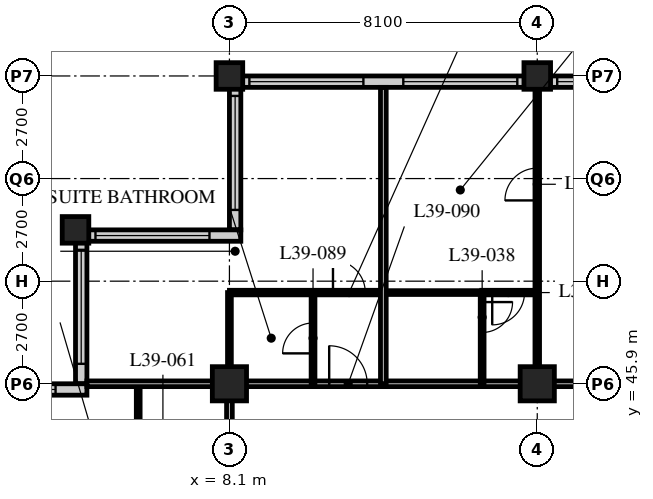
"""IFC4 building model, lengths in metres.
Left out: names, types, materials, properties, quantities, classifications, styles, units other than length and angle.
Written with IfcOpenShell. Run it as: python <this file> out.ifc"""

import sys

from ifc_helpers import new_model, si_unit, direction, frame, frame_2d, origin, origin_2d, place, context, subcontext, project, spatial, rectangle, hollow_rectangle, extrude, element, fill, save


model = new_model("IFC4")
c1 = context("Model", 3, precision=1e-05, world=origin(), true_north=direction((0.0, 1.0)))
c2 = subcontext(c1, "Body", "Model", "MODEL_VIEW")
j1 = project(units=[si_unit("LENGTHUNIT", "METRE"), si_unit("PLANEANGLEUNIT", "RADIAN")], contexts=[c1])
p1 = place(None, origin())
s1 = spatial("IfcSite", under=j1, at=p1, CompositionType="ELEMENT")
p2 = place(p1, origin())
s2 = spatial("IfcBuilding", under=s1, at=p2, CompositionType="ELEMENT")
p3 = place(p2, frame((0.0, 0.0, 151.0)))
s3 = spatial("IfcBuildingStorey", under=s2, at=p3, CompositionType="ELEMENT", Elevation=151.0)
p4 = place(p3, frame((4.05, 49.95, 0.0), z_axis=(0.0, 0.0, 1.0), x_axis=(1.0, 0.0, 0.0)))
e1 = element("IfcColumn", 1, at=p4, inside=s3, PredefinedType="COLUMN", context=c2, shape_type="SweptSolid", body=[
    extrude(hollow_rectangle(XDim=0.7, YDim=0.7, WallThickness=0.07, at=origin_2d()), origin(), (0.0, 0.0, 1.0), 3.4),
])
p5 = place(p3, frame((8.1, 45.9, 0.0), z_axis=(0.0, 0.0, 1.0), x_axis=(1.0, 0.0, 0.0)))
e2 = element("IfcColumn", 2, at=p5, inside=s3, PredefinedType="COLUMN", context=c2, shape_type="SweptSolid", body=[
    extrude(hollow_rectangle(XDim=0.9, YDim=0.9, WallThickness=0.1, at=origin_2d()), origin(), (0.0, 0.0, 1.0), 3.4),
])
p6 = place(p3, frame((8.1, 54.0, 0.0), z_axis=(0.0, 0.0, 1.0), x_axis=(1.0, 0.0, 0.0)))
e3 = element("IfcColumn", 3, at=p6, inside=s3, PredefinedType="COLUMN", context=c2, shape_type="SweptSolid", body=[
    extrude(hollow_rectangle(XDim=0.7, YDim=0.7, WallThickness=0.07, at=origin_2d()), origin(), (0.0, 0.0, 1.0), 3.4),
])
p7 = place(p3, frame((16.2, 45.9, 0.0), z_axis=(0.0, 0.0, 1.0), x_axis=(1.0, 0.0, 0.0)))
e4 = element("IfcColumn", 4, at=p7, inside=s3, PredefinedType="COLUMN", context=c2, shape_type="SweptSolid", body=[
    extrude(hollow_rectangle(XDim=0.9, YDim=0.9, WallThickness=0.1, at=origin_2d()), origin(), (0.0, 0.0, 1.0), 3.4),
])
p8 = place(p3, frame((16.2, 54.0, 0.0), z_axis=(0.0, 0.0, 1.0), x_axis=(1.0, 0.0, 0.0)))
e5 = element("IfcColumn", 5, at=p8, inside=s3, PredefinedType="COLUMN", context=c2, shape_type="SweptSolid", body=[
    extrude(hollow_rectangle(XDim=0.7, YDim=0.7, WallThickness=0.07, at=origin_2d()), origin(), (0.0, 0.0, 1.0), 3.4),
])
p9 = place(p3, frame((48.3, 53.85, 0.0), z_axis=(0.0, 0.0, 1.0), x_axis=(-1.0, 0.0, 0.0)))
e6 = element("IfcWall", 6, at=p9, inside=s3, PredefinedType="SOLIDWALL", context=c2, shape_type="SweptSolid", body=[
    extrude(rectangle(XDim=40.2, YDim=0.3, at=frame_2d((20.1, 0.0))), origin(), (0.0, 0.0, 1.0), 3.19),
])
p10 = place(p9, frame((0.225, 0.0, 0.9)))
e7 = element("IfcOpeningElement", 7, at=p10, cuts=e6, PredefinedType="OPENING", context=c2, shape_type="SweptSolid", body=[
    extrude(rectangle(XDim=3.0, YDim=1.4, at=frame_2d((1.5, 0.7))), frame((0.0, 0.16, 0.0), z_axis=(0.0, -1.0, 0.0), x_axis=(1.0, 0.0, 0.0)), (0.0, 0.0, 1.0), 0.32),
])
p11 = place(p9, frame((4.275, 0.0, 0.9)))
e8 = element("IfcOpeningElement", 8, at=p11, cuts=e6, PredefinedType="OPENING", context=c2, shape_type="SweptSolid", body=[
    extrude(rectangle(XDim=3.0, YDim=1.4, at=frame_2d((1.5, 0.7))), frame((0.0, 0.16, 0.0), z_axis=(0.0, -1.0, 0.0), x_axis=(1.0, 0.0, 0.0)), (0.0, 0.0, 1.0), 0.32),
])
p12 = place(p9, frame((8.325, 0.0, 0.9)))
e9 = element("IfcOpeningElement", 9, at=p12, cuts=e6, PredefinedType="OPENING", context=c2, shape_type="SweptSolid", body=[
    extrude(rectangle(XDim=3.0, YDim=1.4, at=frame_2d((1.5, 0.7))), frame((0.0, 0.16, 0.0), z_axis=(0.0, -1.0, 0.0), x_axis=(1.0, 0.0, 0.0)), (0.0, 0.0, 1.0), 0.32),
])
p13 = place(p9, frame((12.375, 0.0, 0.9)))
e10 = element("IfcOpeningElement", 10, at=p13, cuts=e6, PredefinedType="OPENING", context=c2, shape_type="SweptSolid", body=[
    extrude(rectangle(XDim=3.0, YDim=1.4, at=frame_2d((1.5, 0.7))), frame((0.0, 0.16, 0.0), z_axis=(0.0, -1.0, 0.0), x_axis=(1.0, 0.0, 0.0)), (0.0, 0.0, 1.0), 0.32),
])
p14 = place(p9, frame((16.425, 0.0, 0.9)))
e11 = element("IfcOpeningElement", 11, at=p14, cuts=e6, PredefinedType="OPENING", context=c2, shape_type="SweptSolid", body=[
    extrude(rectangle(XDim=3.0, YDim=1.4, at=frame_2d((1.5, 0.7))), frame((0.0, 0.16, 0.0), z_axis=(0.0, -1.0, 0.0), x_axis=(1.0, 0.0, 0.0)), (0.0, 0.0, 1.0), 0.32),
])
p15 = place(p9, frame((20.475, 0.0, 0.9)))
e12 = element("IfcOpeningElement", 12, at=p15, cuts=e6, PredefinedType="OPENING", context=c2, shape_type="SweptSolid", body=[
    extrude(rectangle(XDim=3.0, YDim=1.4, at=frame_2d((1.5, 0.7))), frame((0.0, 0.16, 0.0), z_axis=(0.0, -1.0, 0.0), x_axis=(1.0, 0.0, 0.0)), (0.0, 0.0, 1.0), 0.32),
])
p16 = place(p9, frame((24.525, 0.0, 0.9)))
e13 = element("IfcOpeningElement", 13, at=p16, cuts=e6, PredefinedType="OPENING", context=c2, shape_type="SweptSolid", body=[
    extrude(rectangle(XDim=3.0, YDim=1.4, at=frame_2d((1.5, 0.7))), frame((0.0, 0.16, 0.0), z_axis=(0.0, -1.0, 0.0), x_axis=(1.0, 0.0, 0.0)), (0.0, 0.0, 1.0), 0.32),
])
p17 = place(p9, frame((28.575, 0.0, 0.9)))
e14 = element("IfcOpeningElement", 14, at=p17, cuts=e6, PredefinedType="OPENING", context=c2, shape_type="SweptSolid", body=[
    extrude(rectangle(XDim=3.0, YDim=1.4, at=frame_2d((1.5, 0.7))), frame((0.0, 0.16, 0.0), z_axis=(0.0, -1.0, 0.0), x_axis=(1.0, 0.0, 0.0)), (0.0, 0.0, 1.0), 0.32),
])
p18 = place(p9, frame((32.625, 0.0, 0.9)))
e15 = element("IfcOpeningElement", 15, at=p18, cuts=e6, PredefinedType="OPENING", context=c2, shape_type="SweptSolid", body=[
    extrude(rectangle(XDim=3.0, YDim=1.4, at=frame_2d((1.5, 0.7))), frame((0.0, 0.16, 0.0), z_axis=(0.0, -1.0, 0.0), x_axis=(1.0, 0.0, 0.0)), (0.0, 0.0, 1.0), 0.32),
])
p19 = place(p9, frame((36.675, 0.0, 0.9)))
e16 = element("IfcOpeningElement", 16, at=p19, cuts=e6, PredefinedType="OPENING", context=c2, shape_type="SweptSolid", body=[
    extrude(rectangle(XDim=3.0, YDim=1.4, at=frame_2d((1.5, 0.7))), frame((0.0, 0.16, 0.0), z_axis=(0.0, -1.0, 0.0), x_axis=(1.0, 0.0, 0.0)), (0.0, 0.0, 1.0), 0.32),
])
p20 = place(p3, frame((8.25, 53.7, 0.0), z_axis=(0.0, 0.0, 1.0), x_axis=(0.0, -1.0, 0.0)))
e17 = element("IfcWall", 17, at=p20, inside=s3, PredefinedType="SOLIDWALL", context=c2, shape_type="SweptSolid", body=[
    extrude(rectangle(XDim=3.75, YDim=0.3, at=frame_2d((1.875, 0.0))), origin(), (0.0, 0.0, 1.0), 3.19),
])
p21 = place(p20, frame((0.225, 0.0, 0.9)))
e18 = element("IfcOpeningElement", 18, at=p21, cuts=e17, PredefinedType="OPENING", context=c2, shape_type="SweptSolid", body=[
    extrude(rectangle(XDim=3.0, YDim=1.4, at=frame_2d((1.5, 0.7))), frame((0.0, 0.16, 0.0), z_axis=(0.0, -1.0, 0.0), x_axis=(1.0, 0.0, 0.0)), (0.0, 0.0, 1.0), 0.32),
])
p22 = place(p3, frame((8.4, 49.8, 0.0), z_axis=(0.0, 0.0, 1.0), x_axis=(-1.0, 0.0, 0.0)))
e19 = element("IfcWall", 19, at=p22, inside=s3, PredefinedType="SOLIDWALL", context=c2, shape_type="SweptSolid", body=[
    extrude(rectangle(XDim=4.35, YDim=0.3, at=frame_2d((2.175, 0.0))), origin(), (0.0, 0.0, 1.0), 3.19),
])
p23 = place(p22, frame((0.825, 0.0, 0.9)))
e20 = element("IfcOpeningElement", 20, at=p23, cuts=e19, PredefinedType="OPENING", context=c2, shape_type="SweptSolid", body=[
    extrude(rectangle(XDim=3.0, YDim=1.4, at=frame_2d((1.5, 0.7))), frame((0.0, 0.16, 0.0), z_axis=(0.0, -1.0, 0.0), x_axis=(1.0, 0.0, 0.0)), (0.0, 0.0, 1.0), 0.32),
])
p24 = place(p3, frame((4.2, 49.65, 0.0), z_axis=(0.0, 0.0, 1.0), x_axis=(0.0, -1.0, 0.0)))
e21 = element("IfcWall", 21, at=p24, inside=s3, PredefinedType="SOLIDWALL", context=c2, shape_type="SweptSolid", body=[
    extrude(rectangle(XDim=3.75, YDim=0.3, at=frame_2d((1.875, 0.0))), origin(), (0.0, 0.0, 1.0), 3.19),
])
p25 = place(p24, frame((0.225, 0.0, 0.9)))
e22 = element("IfcOpeningElement", 22, at=p25, cuts=e21, PredefinedType="OPENING", context=c2, shape_type="SweptSolid", body=[
    extrude(rectangle(XDim=3.0, YDim=1.4, at=frame_2d((1.5, 0.7))), frame((0.0, 0.16, 0.0), z_axis=(0.0, -1.0, 0.0), x_axis=(1.0, 0.0, 0.0)), (0.0, 0.0, 1.0), 0.32),
])
p26 = place(p3, frame((4.35, 45.75, 0.0), z_axis=(0.0, 0.0, 1.0), x_axis=(-1.0, 0.0, 0.0)))
e23 = element("IfcWall", 23, at=p26, inside=s3, PredefinedType="SOLIDWALL", context=c2, shape_type="SweptSolid", body=[
    extrude(rectangle(XDim=4.35, YDim=0.3, at=frame_2d((2.175, 0.0))), origin(), (0.0, 0.0, 1.0), 3.19),
])
p27 = place(p26, frame((0.825, 0.0, 0.9)))
e24 = element("IfcOpeningElement", 24, at=p27, cuts=e23, PredefinedType="OPENING", context=c2, shape_type="SweptSolid", body=[
    extrude(rectangle(XDim=3.0, YDim=1.4, at=frame_2d((1.5, 0.7))), frame((0.0, 0.16, 0.0), z_axis=(0.0, -1.0, 0.0), x_axis=(1.0, 0.0, 0.0)), (0.0, 0.0, 1.0), 0.32),
])
p28 = place(p3, frame((8.1, 45.9, 0.0), z_axis=(0.0, 0.0, 1.0), x_axis=(1.0, 0.0, 0.0)))
e25 = element("IfcWall", 25, at=p28, inside=s3, PredefinedType="PARTITIONING", context=c2, shape_type="SweptSolid", body=[
    extrude(rectangle(XDim=40.5, YDim=0.15, at=frame_2d((20.25, 0.0))), origin(), (0.0, 0.0, 1.0), 2.42),
])
p29 = place(p28, frame((9.625, 0.0, 0.0)))
e26 = element("IfcOpeningElement", 26, at=p29, cuts=e25, PredefinedType="OPENING", context=c2, shape_type="SweptSolid", body=[
    extrude(rectangle(XDim=1.0, YDim=2.1, at=frame_2d((0.5, 1.05))), frame((0.0, 0.085, 0.0), z_axis=(0.0, -1.0, 0.0), x_axis=(1.0, 0.0, 0.0)), (0.0, 0.0, 1.0), 0.17),
])
p30 = place(p28, frame((21.775, 0.0, 0.0)))
e27 = element("IfcOpeningElement", 27, at=p30, cuts=e25, PredefinedType="OPENING", context=c2, shape_type="SweptSolid", body=[
    extrude(rectangle(XDim=1.0, YDim=2.1, at=frame_2d((0.5, 1.05))), frame((0.0, 0.085, 0.0), z_axis=(0.0, -1.0, 0.0), x_axis=(1.0, 0.0, 0.0)), (0.0, 0.0, 1.0), 0.17),
])
p31 = place(p28, frame((28.95, 0.0, 0.0)))
e28 = element("IfcOpeningElement", 28, at=p31, cuts=e25, PredefinedType="OPENING", context=c2, shape_type="SweptSolid", body=[
    extrude(rectangle(XDim=1.0, YDim=2.1, at=frame_2d((0.5, 1.05))), frame((0.0, 0.085, 0.0), z_axis=(0.0, -1.0, 0.0), x_axis=(1.0, 0.0, 0.0)), (0.0, 0.0, 1.0), 0.17),
])
p32 = place(p28, frame((34.85, 0.0, 0.0)))
e29 = element("IfcOpeningElement", 29, at=p32, cuts=e25, PredefinedType="OPENING", context=c2, shape_type="SweptSolid", body=[
    extrude(rectangle(XDim=1.0, YDim=2.1, at=frame_2d((0.5, 1.05))), frame((0.0, 0.085, 0.0), z_axis=(0.0, -1.0, 0.0), x_axis=(1.0, 0.0, 0.0)), (0.0, 0.0, 1.0), 0.17),
])
p33 = place(p28, frame((36.875, 0.0, 0.0)))
e30 = element("IfcOpeningElement", 30, at=p33, cuts=e25, PredefinedType="OPENING", context=c2, shape_type="SweptSolid", body=[
    extrude(rectangle(XDim=1.0, YDim=2.1, at=frame_2d((0.5, 1.05))), frame((0.0, 0.085, 0.0), z_axis=(0.0, -1.0, 0.0), x_axis=(1.0, 0.0, 0.0)), (0.0, 0.0, 1.0), 0.17),
])
p34 = place(p28, frame((2.625, 0.0, 0.0)))
e31 = element("IfcOpeningElement", 31, at=p34, cuts=e25, PredefinedType="OPENING", context=c2, shape_type="SweptSolid", body=[
    extrude(rectangle(XDim=1.0, YDim=2.1, at=frame_2d((0.5, 1.05))), frame((0.0, 0.085, 0.0), z_axis=(0.0, -1.0, 0.0), x_axis=(1.0, 0.0, 0.0)), (0.0, 0.0, 1.0), 0.17),
])
p35 = place(p3, frame((8.1, 17.55, 0.0), z_axis=(0.0, 0.0, 1.0), x_axis=(0.0, 1.0, 0.0)))
e32 = element("IfcWall", 32, at=p35, inside=s3, PredefinedType="PARTITIONING", context=c2, shape_type="SweptSolid", body=[
    extrude(rectangle(XDim=28.35, YDim=0.15, at=frame_2d((14.175, 0.0))), origin(), (0.0, 0.0, 1.0), 2.42),
])
p36 = place(p35, frame((5.95, 0.0, 0.0)))
e33 = element("IfcOpeningElement", 33, at=p36, cuts=e32, PredefinedType="OPENING", context=c2, shape_type="SweptSolid", body=[
    extrude(rectangle(XDim=1.0, YDim=2.1, at=frame_2d((0.5, 1.05))), frame((0.0, 0.085, 0.0), z_axis=(0.0, -1.0, 0.0), x_axis=(1.0, 0.0, 0.0)), (0.0, 0.0, 1.0), 0.17),
])
p37 = place(p35, frame((16.8, 0.0, 0.0)))
e34 = element("IfcOpeningElement", 34, at=p37, cuts=e32, PredefinedType="OPENING", context=c2, shape_type="SweptSolid", body=[
    extrude(rectangle(XDim=1.0, YDim=2.1, at=frame_2d((0.5, 1.05))), frame((0.0, 0.085, 0.0), z_axis=(0.0, -1.0, 0.0), x_axis=(1.0, 0.0, 0.0)), (0.0, 0.0, 1.0), 0.17),
])
p38 = place(p35, frame((22.7, 0.0, 0.0)))
e35 = element("IfcOpeningElement", 35, at=p38, cuts=e32, PredefinedType="OPENING", context=c2, shape_type="SweptSolid", body=[
    extrude(rectangle(XDim=1.0, YDim=2.1, at=frame_2d((0.5, 1.05))), frame((0.0, 0.085, 0.0), z_axis=(0.0, -1.0, 0.0), x_axis=(1.0, 0.0, 0.0)), (0.0, 0.0, 1.0), 0.17),
])
p39 = place(p35, frame((24.9, 0.0, 0.0)))
e36 = element("IfcOpeningElement", 36, at=p39, cuts=e32, PredefinedType="OPENING", context=c2, shape_type="SweptSolid", body=[
    extrude(rectangle(XDim=1.0, YDim=2.1, at=frame_2d((0.5, 1.05))), frame((0.0, 0.085, 0.0), z_axis=(0.0, -1.0, 0.0), x_axis=(1.0, 0.0, 0.0)), (0.0, 0.0, 1.0), 0.17),
])
p40 = place(p3, frame((12.15, 48.3, 0.0), z_axis=(0.0, 0.0, 1.0), x_axis=(1.0, 0.0, 0.0)))
e37 = element("IfcWall", 37, at=p40, inside=s3, PredefinedType="PARTITIONING", context=c2, shape_type="SweptSolid", body=[
    extrude(rectangle(XDim=2.6, YDim=0.1, at=frame_2d((1.3, 0.0))), origin(), (0.0, 0.0, 1.0), 3.19),
])
p41 = place(p3, frame((14.75, 45.9, 0.0), z_axis=(0.0, 0.0, 1.0), x_axis=(0.0, 1.0, 0.0)))
e38 = element("IfcWall", 38, at=p41, inside=s3, PredefinedType="PARTITIONING", context=c2, shape_type="SweptSolid", body=[
    extrude(rectangle(XDim=2.4, YDim=0.1, at=frame_2d((1.2, 0.0))), origin(), (0.0, 0.0, 1.0), 3.19),
])
p42 = place(p41, frame((1.35, 0.0, 0.0)))
e39 = element("IfcOpeningElement", 39, at=p42, cuts=e38, PredefinedType="OPENING", context=c2, shape_type="SweptSolid", body=[
    extrude(rectangle(XDim=0.8, YDim=2.1, at=frame_2d((0.4, 1.05))), frame((0.0, 0.06, 0.0), z_axis=(0.0, -1.0, 0.0), x_axis=(1.0, 0.0, 0.0)), (0.0, 0.0, 1.0), 0.12),
])
p43 = place(p3, frame((16.2, 45.9, 0.0), z_axis=(0.0, 0.0, 1.0), x_axis=(0.0, 1.0, 0.0)))
e40 = element("IfcWall", 40, at=p43, inside=s3, PredefinedType="PARTITIONING", context=c2, shape_type="SweptSolid", body=[
    extrude(rectangle(XDim=7.8, YDim=0.12, at=frame_2d((3.9, 0.0))), origin(), (0.0, 0.0, 1.0), 2.42),
])
p44 = place(p43, frame((4.825, 0.0, 0.0)))
e41 = element("IfcOpeningElement", 41, at=p44, cuts=e40, PredefinedType="OPENING", context=c2, shape_type="SweptSolid", body=[
    extrude(rectangle(XDim=0.85, YDim=2.1, at=frame_2d((0.425, 1.05))), frame((0.0, 0.07, 0.0), z_axis=(0.0, -1.0, 0.0), x_axis=(1.0, 0.0, 0.0)), (0.0, 0.0, 1.0), 0.14),
])
p45 = place(p3, frame((5.7, 43.6, 0.0), z_axis=(0.0, 0.0, 1.0), x_axis=(0.0, 1.0, 0.0)))
e42 = element("IfcWall", 42, at=p45, inside=s3, PredefinedType="PARTITIONING", context=c2, shape_type="SweptSolid", body=[
    extrude(rectangle(XDim=2.3, YDim=0.1, at=frame_2d((1.15, 0.0))), origin(), (0.0, 0.0, 1.0), 3.19),
])
p46 = place(p3, frame((8.1, 48.3, 0.0), z_axis=(0.0, 0.0, 1.0), x_axis=(1.0, 0.0, 0.0)))
e43 = element("IfcWall", 43, at=p46, inside=s3, PredefinedType="PARTITIONING", context=c2, shape_type="SweptSolid", body=[
    extrude(rectangle(XDim=4.05, YDim=0.12, at=frame_2d((2.025, 0.0))), origin(), (0.0, 0.0, 1.0), 3.19),
])
p47 = place(p46, frame((2.725, 0.0, 0.0)))
e44 = element("IfcOpeningElement", 44, at=p47, cuts=e43, PredefinedType="OPENING", context=c2, shape_type="SweptSolid", body=[
    extrude(rectangle(XDim=0.85, YDim=2.1, at=frame_2d((0.425, 1.05))), frame((0.0, 0.07, 0.0), z_axis=(0.0, -1.0, 0.0), x_axis=(1.0, 0.0, 0.0)), (0.0, 0.0, 1.0), 0.14),
])
p48 = place(p3, frame((10.3, 45.9, 0.0), z_axis=(0.0, 0.0, 1.0), x_axis=(0.0, 1.0, 0.0)))
e45 = element("IfcWall", 45, at=p48, inside=s3, PredefinedType="PARTITIONING", context=c2, shape_type="SweptSolid", body=[
    extrude(rectangle(XDim=2.4, YDim=0.1, at=frame_2d((1.2, 0.0))), origin(), (0.0, 0.0, 1.0), 3.19),
])
p49 = place(p48, frame((0.8, 0.0, 0.0)))
e46 = element("IfcOpeningElement", 46, at=p49, cuts=e45, PredefinedType="OPENING", context=c2, shape_type="SweptSolid", body=[
    extrude(rectangle(XDim=0.8, YDim=2.1, at=frame_2d((0.4, 1.05))), frame((0.0, 0.06, 0.0), z_axis=(0.0, -1.0, 0.0), x_axis=(1.0, 0.0, 0.0)), (0.0, 0.0, 1.0), 0.12),
])
p50 = place(p3, frame((8.1, 45.9, 0.0), z_axis=(0.0, 0.0, 1.0), x_axis=(0.0, 1.0, 0.0)))
e47 = element("IfcWall", 47, at=p50, inside=s3, PredefinedType="PARTITIONING", context=c2, shape_type="SweptSolid", body=[
    extrude(rectangle(XDim=2.4, YDim=0.1, at=frame_2d((1.2, 0.0))), origin(), (0.0, 0.0, 1.0), 2.42),
])
p51 = place(p3, frame((4.35, 45.9, 0.0), z_axis=(0.0, 0.0, 1.0), x_axis=(1.0, 0.0, 0.0)))
e48 = element("IfcWall", 48, at=p51, inside=s3, PredefinedType="PARTITIONING", context=c2, shape_type="SweptSolid", body=[
    extrude(rectangle(XDim=3.75, YDim=0.15, at=frame_2d((1.875, 0.0))), origin(), (0.0, 0.0, 1.0), 2.42),
])
p52 = place(p3, frame((12.15, 45.9, 0.0), z_axis=(0.0, 0.0, 1.0), x_axis=(0.0, 1.0, 0.0)))
e49 = element("IfcWall", 49, at=p52, inside=s3, PredefinedType="PARTITIONING", context=c2, shape_type="SweptSolid", body=[
    extrude(rectangle(XDim=7.8, YDim=0.15, at=frame_2d((3.9, 0.0))), origin(), (0.0, 0.0, 1.0), 3.19),
])
p53 = place(p3, frame((14.74, 48.3, 0.0), z_axis=(0.0, 0.0, 1.0), x_axis=(1.0, 0.0, 0.0)))
e50 = element("IfcWall", 50, at=p53, inside=s3, PredefinedType="PARTITIONING", context=c2, shape_type="SweptSolid", body=[
    extrude(rectangle(XDim=1.46, YDim=0.12, at=frame_2d((0.73, 0.0))), origin(), (0.0, 0.0, 1.0), 3.19),
])
p54 = place(p53, frame((0.275, 0.0, 0.0)))
e51 = element("IfcOpeningElement", 51, at=p54, cuts=e50, PredefinedType="OPENING", context=c2, shape_type="SweptSolid", body=[
    extrude(rectangle(XDim=0.85, YDim=2.1, at=frame_2d((0.425, 1.05))), frame((0.0, 0.07, 0.0), z_axis=(0.0, -1.0, 0.0), x_axis=(1.0, 0.0, 0.0)), (0.0, 0.0, 1.0), 0.14),
])
p55 = place(p17, origin())
e52 = element("IfcWindow", 52, at=p55, inside=s3, PartitioningType="SINGLE_PANEL", PredefinedType="WINDOW", context=c2, shape_type="SweptSolid", body=[
    extrude(rectangle(XDim=3.0, YDim=1.4, at=frame_2d((1.5, 0.7))), frame((0.0, 0.03, 0.0), z_axis=(0.0, -1.0, 0.0), x_axis=(1.0, 0.0, 0.0)), (0.0, 0.0, 1.0), 0.06),
])
fill(e14, e52)
p56 = place(p18, origin())
e53 = element("IfcWindow", 53, at=p56, inside=s3, PartitioningType="SINGLE_PANEL", PredefinedType="WINDOW", context=c2, shape_type="SweptSolid", body=[
    extrude(rectangle(XDim=3.0, YDim=1.4, at=frame_2d((1.5, 0.7))), frame((0.0, 0.03, 0.0), z_axis=(0.0, -1.0, 0.0), x_axis=(1.0, 0.0, 0.0)), (0.0, 0.0, 1.0), 0.06),
])
fill(e15, e53)
p57 = place(p19, origin())
e54 = element("IfcWindow", 54, at=p57, inside=s3, PartitioningType="SINGLE_PANEL", PredefinedType="WINDOW", context=c2, shape_type="SweptSolid", body=[
    extrude(rectangle(XDim=3.0, YDim=1.4, at=frame_2d((1.5, 0.7))), frame((0.0, 0.03, 0.0), z_axis=(0.0, -1.0, 0.0), x_axis=(1.0, 0.0, 0.0)), (0.0, 0.0, 1.0), 0.06),
])
fill(e16, e54)
p58 = place(p21, origin())
e55 = element("IfcWindow", 55, at=p58, inside=s3, PartitioningType="SINGLE_PANEL", PredefinedType="WINDOW", context=c2, shape_type="SweptSolid", body=[
    extrude(rectangle(XDim=3.0, YDim=1.4, at=frame_2d((1.5, 0.7))), frame((0.0, 0.03, 0.0), z_axis=(0.0, -1.0, 0.0), x_axis=(1.0, 0.0, 0.0)), (0.0, 0.0, 1.0), 0.06),
])
fill(e18, e55)
p59 = place(p23, origin())
e56 = element("IfcWindow", 56, at=p59, inside=s3, PartitioningType="SINGLE_PANEL", PredefinedType="WINDOW", context=c2, shape_type="SweptSolid", body=[
    extrude(rectangle(XDim=3.0, YDim=1.4, at=frame_2d((1.5, 0.7))), frame((0.0, 0.03, 0.0), z_axis=(0.0, -1.0, 0.0), x_axis=(1.0, 0.0, 0.0)), (0.0, 0.0, 1.0), 0.06),
])
fill(e20, e56)
p60 = place(p25, origin())
e57 = element("IfcWindow", 57, at=p60, inside=s3, PartitioningType="SINGLE_PANEL", PredefinedType="WINDOW", context=c2, shape_type="SweptSolid", body=[
    extrude(rectangle(XDim=3.0, YDim=1.4, at=frame_2d((1.5, 0.7))), frame((0.0, 0.03, 0.0), z_axis=(0.0, -1.0, 0.0), x_axis=(1.0, 0.0, 0.0)), (0.0, 0.0, 1.0), 0.06),
])
fill(e22, e57)
p61 = place(p27, origin())
e58 = element("IfcWindow", 58, at=p61, inside=s3, PartitioningType="SINGLE_PANEL", PredefinedType="WINDOW", context=c2, shape_type="SweptSolid", body=[
    extrude(rectangle(XDim=3.0, YDim=1.4, at=frame_2d((1.5, 0.7))), frame((0.0, 0.03, 0.0), z_axis=(0.0, -1.0, 0.0), x_axis=(1.0, 0.0, 0.0)), (0.0, 0.0, 1.0), 0.06),
])
fill(e24, e58)
p62 = place(p42, origin())
e59 = element("IfcDoor", 59, at=p62, inside=s3, OperationType="SINGLE_SWING_LEFT", PredefinedType="DOOR", context=c2, shape_type="SweptSolid", body=[
    extrude(rectangle(XDim=0.8, YDim=2.1, at=frame_2d((0.4, 1.05))), frame((0.0, 0.025, 0.0), z_axis=(0.0, -1.0, 0.0), x_axis=(1.0, 0.0, 0.0)), (0.0, 0.0, 1.0), 0.05),
])
fill(e39, e59)
p63 = place(p44, origin())
e60 = element("IfcDoor", 60, at=p63, inside=s3, OperationType="SINGLE_SWING_LEFT", PredefinedType="DOOR", context=c2, shape_type="SweptSolid", body=[
    extrude(rectangle(XDim=0.85, YDim=2.1, at=frame_2d((0.425, 1.05))), frame((0.0, 0.025, 0.0), z_axis=(0.0, -1.0, 0.0), x_axis=(1.0, 0.0, 0.0)), (0.0, 0.0, 1.0), 0.05),
])
fill(e41, e60)
p64 = place(p49, origin())
e61 = element("IfcDoor", 61, at=p64, inside=s3, OperationType="SINGLE_SWING_LEFT", PredefinedType="DOOR", context=c2, shape_type="SweptSolid", body=[
    extrude(rectangle(XDim=0.8, YDim=2.1, at=frame_2d((0.4, 1.05))), frame((0.0, 0.025, 0.0), z_axis=(0.0, -1.0, 0.0), x_axis=(1.0, 0.0, 0.0)), (0.0, 0.0, 1.0), 0.05),
])
fill(e46, e61)
p65 = place(p34, origin())
e62 = element("IfcDoor", 62, at=p65, inside=s3, OperationType="SINGLE_SWING_LEFT", PredefinedType="DOOR", context=c2, shape_type="SweptSolid", body=[
    extrude(rectangle(XDim=1.0, YDim=2.1, at=frame_2d((0.5, 1.05))), frame((0.0, 0.025, 0.0), z_axis=(0.0, -1.0, 0.0), x_axis=(1.0, 0.0, 0.0)), (0.0, 0.0, 1.0), 0.05),
])
fill(e31, e62)
p66 = place(p47, origin())
e63 = element("IfcDoor", 63, at=p66, inside=s3, OperationType="SINGLE_SWING_LEFT", PredefinedType="DOOR", context=c2, shape_type="SweptSolid", body=[
    extrude(rectangle(XDim=0.85, YDim=2.1, at=frame_2d((0.425, 1.05))), frame((0.0, 0.025, 0.0), z_axis=(0.0, -1.0, 0.0), x_axis=(1.0, 0.0, 0.0)), (0.0, 0.0, 1.0), 0.05),
])
fill(e44, e63)
p67 = place(p54, origin())
e64 = element("IfcDoor", 64, at=p67, inside=s3, OperationType="SINGLE_SWING_RIGHT", PredefinedType="DOOR", context=c2, shape_type="SweptSolid", body=[
    extrude(rectangle(XDim=0.85, YDim=2.1, at=frame_2d((0.425, 1.05))), frame((0.0, 0.025, 0.0), z_axis=(0.0, -1.0, 0.0), x_axis=(1.0, 0.0, 0.0)), (0.0, 0.0, 1.0), 0.05),
])
fill(e51, e64)
save(model, sys.argv[1])
